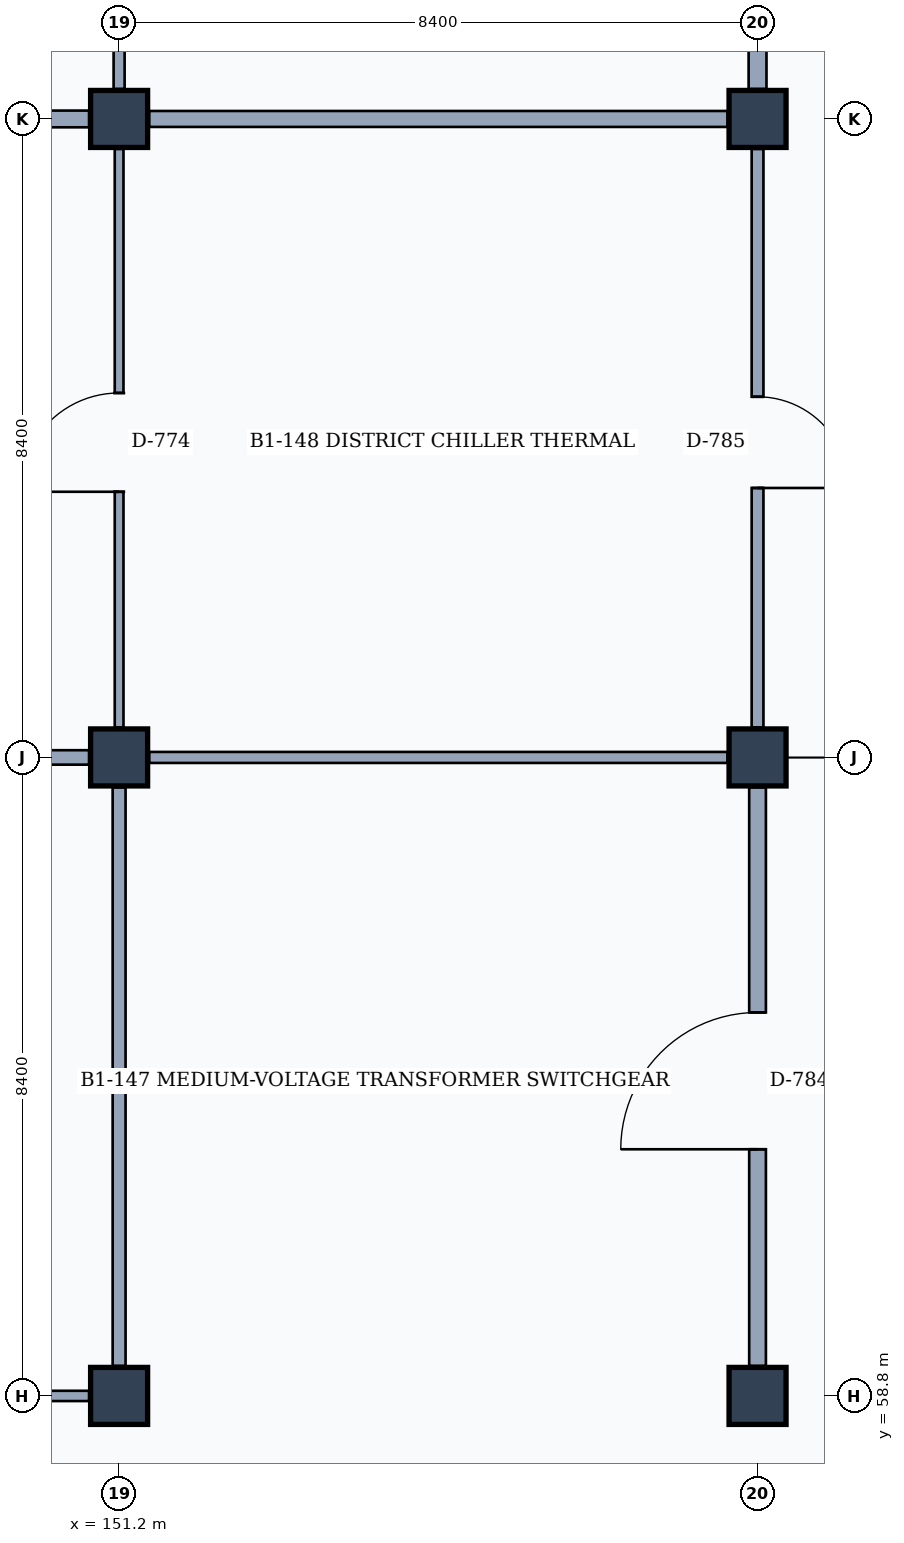
"""IFC4 building model, lengths in metres.
Left out: names, types, materials, properties, quantities, classifications, styles, units other than length and angle.
Written with IfcOpenShell. Run it as: python <this file> out.ifc"""

import sys

from ifc_helpers import new_model, si_unit, direction, frame, frame_2d, origin, origin_2d, place, context, subcontext, project, spatial, rectangle, extrude, element, fill, save


model = new_model("IFC4")
c1 = context("Model", 3, precision=1e-05, world=origin(), true_north=direction((0.0, 1.0)))
c2 = subcontext(c1, "Body", "Model", "MODEL_VIEW")
j1 = project(units=[si_unit("LENGTHUNIT", "METRE"), si_unit("PLANEANGLEUNIT", "RADIAN")], contexts=[c1])
p1 = place(None, origin())
s1 = spatial("IfcSite", under=j1, at=p1, CompositionType="ELEMENT")
p2 = place(p1, origin())
s2 = spatial("IfcBuilding", under=s1, at=p2, CompositionType="ELEMENT")
p3 = place(p2, frame((0.0, 0.0, -4.2)))
s3 = spatial("IfcBuildingStorey", under=s2, at=p3, CompositionType="ELEMENT", Elevation=-4.2)
for number, where, z_axis, x_axis in (
    (1, (151.2, 58.8, 0.0), (0.0, 0.0, 1.0), (1.0, 0.0, 0.0)),
    (2, (151.2, 67.2, 0.0), (0.0, 0.0, 1.0), (1.0, 0.0, 0.0)),
    (3, (151.2, 75.6, 0.0), (0.0, 0.0, 1.0), (1.0, 0.0, 0.0)),
    (4, (159.6, 58.8, 0.0), (0.0, 0.0, 1.0), (1.0, 0.0, 0.0)),
    (5, (159.6, 67.2, 0.0), (0.0, 0.0, 1.0), (1.0, 0.0, 0.0)),
    (6, (159.6, 75.6, 0.0), (0.0, 0.0, 1.0), (1.0, 0.0, 0.0)),
):
    element("IfcColumn", number, at=place(p3, frame(where, z_axis=z_axis, x_axis=x_axis)), inside=s3, PredefinedType="COLUMN", context=c2, shape_type="SweptSolid", body=[
        extrude(rectangle(XDim=0.75, YDim=0.75, at=origin_2d()), origin(), (0.0, 0.0, 1.0), 4.2),
    ])
p4 = place(p3, frame((143.195, 58.8, 0.0), z_axis=(0.0, 0.0, 1.0), x_axis=(1.0, 0.0, 0.0)))
e7 = element("IfcWall", 7, at=p4, inside=s3, PredefinedType="PARTITIONING", context=c2, shape_type="SweptSolid", body=[
    extrude(rectangle(XDim=7.61, YDim=0.135, at=frame_2d((3.805, 0.0))), origin(), (0.0, 0.0, 1.0), 3.05),
])
p5 = place(p4, frame((3.175, 0.0, 0.0)))
e8 = element("IfcOpeningElement", 8, at=p5, cuts=e7, PredefinedType="OPENING", context=c2, shape_type="SweptSolid", body=[
    extrude(rectangle(XDim=1.15, YDim=2.25, at=frame_2d((0.575, 1.125))), frame((0.0, 0.077, 0.0), z_axis=(0.0, -1.0, 0.0), x_axis=(1.0, 0.0, 0.0)), (0.0, 0.0, 1.0), 0.155),
])
p6 = place(p3, frame((151.2, 59.195, 0.0), z_axis=(0.0, 0.0, 1.0), x_axis=(0.0, 1.0, 0.0)))
e9 = element("IfcWall", 9, at=p6, inside=s3, PredefinedType="PARTITIONING", context=c2, shape_type="SweptSolid", body=[
    extrude(rectangle(XDim=7.61, YDim=0.17, at=frame_2d((3.805, 0.0))), origin(), (0.0, 0.0, 1.0), 3.1),
])
p7 = place(p3, frame((143.195, 67.2, 0.0), z_axis=(0.0, 0.0, 1.0), x_axis=(1.0, 0.0, 0.0)))
e10 = element("IfcWall", 10, at=p7, inside=s3, PredefinedType="PARTITIONING", context=c2, shape_type="SweptSolid", body=[
    extrude(rectangle(XDim=7.61, YDim=0.19, at=frame_2d((3.805, 0.0))), origin(), (0.0, 0.0, 1.0), 3.05),
])
p8 = place(p3, frame((151.2, 67.595, 0.0), z_axis=(0.0, 0.0, 1.0), x_axis=(0.0, 1.0, 0.0)))
e11 = element("IfcWall", 11, at=p8, inside=s3, PredefinedType="PARTITIONING", context=c2, shape_type="SweptSolid", body=[
    extrude(rectangle(XDim=7.61, YDim=0.115, at=frame_2d((3.805, 0.0))), origin(), (0.0, 0.0, 1.0), 3.1),
])
p9 = place(p8, frame((3.1, 0.0, 0.0)))
e12 = element("IfcOpeningElement", 12, at=p9, cuts=e11, PredefinedType="OPENING", context=c2, shape_type="SweptSolid", body=[
    extrude(rectangle(XDim=1.3, YDim=2.2, at=frame_2d((0.65, 1.1))), frame((0.0, 0.067, 0.0), z_axis=(0.0, -1.0, 0.0), x_axis=(1.0, 0.0, 0.0)), (0.0, 0.0, 1.0), 0.135),
])
p10 = place(p3, frame((143.195, 75.6, 0.0), z_axis=(0.0, 0.0, 1.0), x_axis=(1.0, 0.0, 0.0)))
e13 = element("IfcWall", 13, at=p10, inside=s3, PredefinedType="PARTITIONING", context=c2, shape_type="SweptSolid", body=[
    extrude(rectangle(XDim=7.61, YDim=0.22, at=frame_2d((3.805, 0.0))), origin(), (0.0, 0.0, 1.0), 3.05),
])
p11 = place(p3, frame((151.2, 75.995, 0.0), z_axis=(0.0, 0.0, 1.0), x_axis=(0.0, 1.0, 0.0)))
e14 = element("IfcWall", 14, at=p11, inside=s3, PredefinedType="PARTITIONING", context=c2, shape_type="SweptSolid", body=[
    extrude(rectangle(XDim=7.61, YDim=0.145, at=frame_2d((3.805, 0.0))), origin(), (0.0, 0.0, 1.0), 3.1),
])
p12 = place(p11, frame((2.975, 0.0, 0.0)))
e15 = element("IfcOpeningElement", 15, at=p12, cuts=e14, PredefinedType="OPENING", context=c2, shape_type="SweptSolid", body=[
    extrude(rectangle(XDim=1.55, YDim=2.35, at=frame_2d((0.775, 1.175))), frame((0.0, 0.083, 0.0), z_axis=(0.0, -1.0, 0.0), x_axis=(1.0, 0.0, 0.0)), (0.0, 0.0, 1.0), 0.165),
])
p13 = place(p3, frame((159.6, 59.195, 0.0), z_axis=(0.0, 0.0, 1.0), x_axis=(0.0, 1.0, 0.0)))
e16 = element("IfcWall", 16, at=p13, inside=s3, PredefinedType="PARTITIONING", context=c2, shape_type="SweptSolid", body=[
    extrude(rectangle(XDim=7.61, YDim=0.22, at=frame_2d((3.805, 0.0))), origin(), (0.0, 0.0, 1.0), 3.1),
])
p14 = place(p13, frame((2.85, 0.0, 0.0)))
e17 = element("IfcOpeningElement", 17, at=p14, cuts=e16, PredefinedType="OPENING", context=c2, shape_type="SweptSolid", body=[
    extrude(rectangle(XDim=1.8, YDim=2.3, at=frame_2d((0.9, 1.15))), frame((0.0, 0.12, 0.0), z_axis=(0.0, -1.0, 0.0), x_axis=(1.0, 0.0, 0.0)), (0.0, 0.0, 1.0), 0.24),
])
p15 = place(p3, frame((151.595, 67.2, 0.0), z_axis=(0.0, 0.0, 1.0), x_axis=(1.0, 0.0, 0.0)))
e18 = element("IfcWall", 18, at=p15, inside=s3, PredefinedType="PARTITIONING", context=c2, shape_type="SweptSolid", body=[
    extrude(rectangle(XDim=7.61, YDim=0.145, at=frame_2d((3.805, 0.0))), origin(), (0.0, 0.0, 1.0), 3.05),
])
p16 = place(p3, frame((159.6, 67.595, 0.0), z_axis=(0.0, 0.0, 1.0), x_axis=(0.0, 1.0, 0.0)))
e19 = element("IfcWall", 19, at=p16, inside=s3, PredefinedType="PARTITIONING", context=c2, shape_type="SweptSolid", body=[
    extrude(rectangle(XDim=7.61, YDim=0.155, at=frame_2d((3.805, 0.0))), origin(), (0.0, 0.0, 1.0), 3.1),
])
p17 = place(p16, frame((3.15, 0.0, 0.0)))
e20 = element("IfcOpeningElement", 20, at=p17, cuts=e19, PredefinedType="OPENING", context=c2, shape_type="SweptSolid", body=[
    extrude(rectangle(XDim=1.2, YDim=2.2, at=frame_2d((0.6, 1.1))), frame((0.0, 0.087, 0.0), z_axis=(0.0, -1.0, 0.0), x_axis=(1.0, 0.0, 0.0)), (0.0, 0.0, 1.0), 0.175),
])
p18 = place(p3, frame((151.595, 75.6, 0.0), z_axis=(0.0, 0.0, 1.0), x_axis=(1.0, 0.0, 0.0)))
e21 = element("IfcWall", 21, at=p18, inside=s3, PredefinedType="PARTITIONING", context=c2, shape_type="SweptSolid", body=[
    extrude(rectangle(XDim=7.61, YDim=0.21, at=frame_2d((3.805, 0.0))), origin(), (0.0, 0.0, 1.0), 3.05),
])
p19 = place(p3, frame((159.6, 75.995, 0.0), z_axis=(0.0, 0.0, 1.0), x_axis=(0.0, 1.0, 0.0)))
e22 = element("IfcWall", 22, at=p19, inside=s3, PredefinedType="PARTITIONING", context=c2, shape_type="SweptSolid", body=[
    extrude(rectangle(XDim=7.61, YDim=0.235, at=frame_2d((3.805, 0.0))), origin(), (0.0, 0.0, 1.0), 3.1),
])
p20 = place(p19, frame((3.05, 0.0, 0.0)))
e23 = element("IfcOpeningElement", 23, at=p20, cuts=e22, PredefinedType="OPENING", context=c2, shape_type="SweptSolid", body=[
    extrude(rectangle(XDim=1.4, YDim=2.25, at=frame_2d((0.7, 1.125))), frame((0.0, 0.127, 0.0), z_axis=(0.0, -1.0, 0.0), x_axis=(1.0, 0.0, 0.0)), (0.0, 0.0, 1.0), 0.255),
])
p21 = place(p9, origin())
e24 = element("IfcDoor", 24, at=p21, inside=s3, OperationType="SINGLE_SWING_LEFT", PredefinedType="DOOR", context=c2, shape_type="SweptSolid", body=[
    extrude(rectangle(XDim=1.3, YDim=2.2, at=frame_2d((0.65, 1.1))), frame((0.0, 0.025, 0.0), z_axis=(0.0, -1.0, 0.0), x_axis=(1.0, 0.0, 0.0)), (0.0, 0.0, 1.0), 0.05),
])
fill(e12, e24)
p22 = place(p14, origin())
e25 = element("IfcDoor", 25, at=p22, inside=s3, OperationType="SINGLE_SWING_LEFT", PredefinedType="DOOR", context=c2, shape_type="SweptSolid", body=[
    extrude(rectangle(XDim=1.8, YDim=2.3, at=frame_2d((0.9, 1.15))), frame((0.0, 0.025, 0.0), z_axis=(0.0, -1.0, 0.0), x_axis=(1.0, 0.0, 0.0)), (0.0, 0.0, 1.0), 0.05),
])
fill(e17, e25)
p23 = place(p17, frame((1.2, 0.0, 0.0), z_axis=(0.0, 0.0, 1.0), x_axis=(-1.0, 0.0, 0.0)))
e26 = element("IfcDoor", 26, at=p23, inside=s3, OperationType="SINGLE_SWING_RIGHT", PredefinedType="DOOR", context=c2, shape_type="SweptSolid", body=[
    extrude(rectangle(XDim=1.2, YDim=2.2, at=frame_2d((0.6, 1.1))), frame((0.0, 0.025, 0.0), z_axis=(0.0, -1.0, 0.0), x_axis=(1.0, 0.0, 0.0)), (0.0, 0.0, 1.0), 0.05),
])
fill(e20, e26)
save(model, sys.argv[1])
